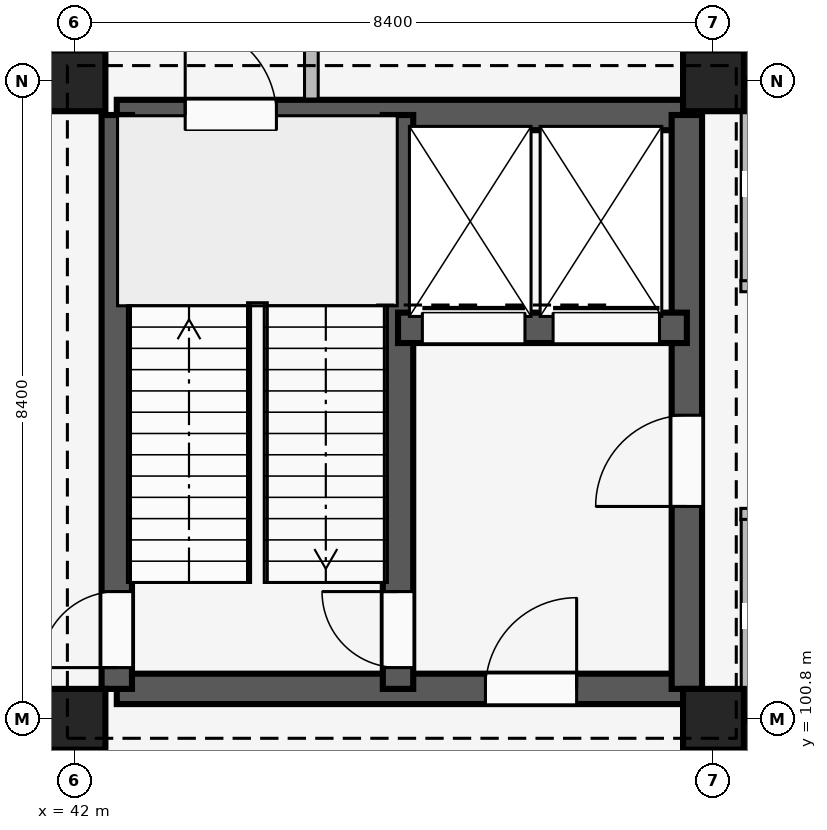
"""IFC4 building model, lengths in metres.
Left out: names, types, materials, properties, quantities, classifications, styles, units other than length and angle.
Written with IfcOpenShell. Run it as: python <this file> out.ifc"""

import sys

from ifc_helpers import new_model, si_unit, direction, frame, frame_2d, origin, origin_2d, place, context, subcontext, project, spatial, rectangle, extrude, element, fill, save


model = new_model("IFC4")
c1 = context("Model", 3, precision=1e-05, world=origin(), true_north=direction((0.0, 1.0)))
c2 = subcontext(c1, "Body", "Model", "MODEL_VIEW")
j1 = project(units=[si_unit("LENGTHUNIT", "METRE"), si_unit("PLANEANGLEUNIT", "RADIAN")], contexts=[c1])
p1 = place(None, origin())
s1 = spatial("IfcSite", under=j1, at=p1, CompositionType="ELEMENT")
p2 = place(p1, origin())
s2 = spatial("IfcBuilding", under=s1, at=p2, CompositionType="ELEMENT")
p3 = place(p2, origin())
s3 = spatial("IfcBuildingStorey", under=s2, at=p3, CompositionType="ELEMENT", Elevation=0.0)
for number, where, z_axis, x_axis in (
    (1, (42.0, 100.8, 0.0), (0.0, 0.0, 1.0), (1.0, 0.0, 0.0)),
    (2, (42.0, 109.2, 0.0), (0.0, 0.0, 1.0), (1.0, 0.0, 0.0)),
    (3, (50.4, 100.8, 0.0), (0.0, 0.0, 1.0), (1.0, 0.0, 0.0)),
    (4, (50.4, 109.2, 0.0), (0.0, 0.0, 1.0), (1.0, 0.0, 0.0)),
):
    element("IfcColumn", number, at=place(p3, frame(where, z_axis=z_axis, x_axis=x_axis)), inside=s3, PredefinedType="COLUMN", context=c2, shape_type="SweptSolid", body=[
        extrude(rectangle(XDim=0.8, YDim=0.8, at=origin_2d()), origin(), (0.0, 0.0, 1.0), 4.8),
    ])
p4 = place(p3, frame((42.55, 101.2, 0.0), z_axis=(0.0, 0.0, 1.0), x_axis=(1.0, 0.0, 0.0)))
e5 = element("IfcWall", 5, at=p4, inside=s3, PredefinedType="SHEAR", context=c2, shape_type="SweptSolid", body=[
    extrude(rectangle(XDim=7.5, YDim=0.4, at=frame_2d((3.75, 0.0))), origin(), (0.0, 0.0, 1.0), 4.52),
])
p5 = place(p4, frame((4.85, 0.0, 0.0)))
e6 = element("IfcOpeningElement", 6, at=p5, cuts=e5, PredefinedType="OPENING", context=c2, shape_type="SweptSolid", body=[
    extrude(rectangle(XDim=1.2, YDim=2.2, at=frame_2d((0.6, 1.1))), frame((0.0, 0.21, 0.0), z_axis=(0.0, -1.0, 0.0), x_axis=(1.0, 0.0, 0.0)), (0.0, 0.0, 1.0), 0.42),
])
p6 = place(p3, frame((42.55, 108.75, 0.0), z_axis=(0.0, 0.0, 1.0), x_axis=(1.0, 0.0, 0.0)))
e7 = element("IfcWall", 7, at=p6, inside=s3, PredefinedType="SHEAR", context=c2, shape_type="SweptSolid", body=[
    extrude(rectangle(XDim=7.5, YDim=0.4, at=frame_2d((3.75, 0.0))), origin(), (0.0, 0.0, 1.0), 4.52),
])
p7 = place(p6, frame((0.9, 0.0, 0.0)))
e8 = element("IfcOpeningElement", 8, at=p7, cuts=e7, PredefinedType="OPENING", context=c2, shape_type="SweptSolid", body=[
    extrude(rectangle(XDim=1.2, YDim=2.1, at=frame_2d((0.6, 1.05))), frame((0.0, 0.21, 0.0), z_axis=(0.0, -1.0, 0.0), x_axis=(1.0, 0.0, 0.0)), (0.0, 0.0, 1.0), 0.42),
])
p8 = place(p3, frame((42.55, 101.2, 0.0), z_axis=(0.0, 0.0, 1.0), x_axis=(0.0, 1.0, 0.0)))
e9 = element("IfcWall", 9, at=p8, inside=s3, PredefinedType="SHEAR", context=c2, shape_type="SweptSolid", body=[
    extrude(rectangle(XDim=7.55, YDim=0.4, at=frame_2d((3.775, 0.0))), origin(), (0.0, 0.0, 1.0), 4.52),
])
p9 = place(p8, frame((0.28, 0.0, 0.0)))
e10 = element("IfcOpeningElement", 10, at=p9, cuts=e9, PredefinedType="OPENING", context=c2, shape_type="SweptSolid", body=[
    extrude(rectangle(XDim=1.0, YDim=2.15, at=frame_2d((0.5, 1.075))), frame((0.0, 0.21, 0.0), z_axis=(0.0, -1.0, 0.0), x_axis=(1.0, 0.0, 0.0)), (0.0, 0.0, 1.0), 0.42),
])
p10 = place(p3, frame((50.05, 101.2, 0.0), z_axis=(0.0, 0.0, 1.0), x_axis=(0.0, 1.0, 0.0)))
e11 = element("IfcWall", 11, at=p10, inside=s3, PredefinedType="SHEAR", context=c2, shape_type="SweptSolid", body=[
    extrude(rectangle(XDim=7.55, YDim=0.4, at=frame_2d((3.775, 0.0))), origin(), (0.0, 0.0, 1.0), 4.52),
])
p11 = place(p10, frame((2.4, 0.0, 0.0)))
e12 = element("IfcOpeningElement", 12, at=p11, cuts=e11, PredefinedType="OPENING", context=c2, shape_type="SweptSolid", body=[
    extrude(rectangle(XDim=1.2, YDim=2.2, at=frame_2d((0.6, 1.1))), frame((0.0, 0.21, 0.0), z_axis=(0.0, -1.0, 0.0), x_axis=(1.0, 0.0, 0.0)), (0.0, 0.0, 1.0), 0.42),
])
p12 = place(p3, frame((46.25, 101.2, 0.0), z_axis=(0.0, 0.0, 1.0), x_axis=(0.0, 1.0, 0.0)))
e13 = element("IfcWall", 13, at=p12, inside=s3, PredefinedType="SHEAR", context=c2, shape_type="SweptSolid", body=[
    extrude(rectangle(XDim=7.55, YDim=0.4, at=frame_2d((3.775, 0.0))), origin(), (0.0, 0.0, 1.0), 4.52),
])
p13 = place(p12, frame((0.28, 0.0, 0.0)))
e14 = element("IfcOpeningElement", 14, at=p13, cuts=e13, PredefinedType="OPENING", context=c2, shape_type="SweptSolid", body=[
    extrude(rectangle(XDim=1.0, YDim=2.15, at=frame_2d((0.5, 1.075))), frame((0.0, 0.21, 0.0), z_axis=(0.0, -1.0, 0.0), x_axis=(1.0, 0.0, 0.0)), (0.0, 0.0, 1.0), 0.42),
])
p14 = place(p3, frame((46.25, 105.95, 0.0), z_axis=(0.0, 0.0, 1.0), x_axis=(1.0, 0.0, 0.0)))
e15 = element("IfcWall", 15, at=p14, inside=s3, PredefinedType="SHEAR", context=c2, shape_type="SweptSolid", body=[
    extrude(rectangle(XDim=3.8, YDim=0.4, at=frame_2d((1.9, 0.0))), origin(), (0.0, 0.0, 1.0), 4.52),
])
p15 = place(p14, frame((0.32, 0.0, 0.0)))
e16 = element("IfcOpeningElement", 16, at=p15, cuts=e15, PredefinedType="OPENING", context=c2, shape_type="SweptSolid", body=[
    extrude(rectangle(XDim=1.35, YDim=2.25, at=frame_2d((0.675, 1.125))), frame((0.0, 0.21, 0.0), z_axis=(0.0, -1.0, 0.0), x_axis=(1.0, 0.0, 0.0)), (0.0, 0.0, 1.0), 0.42),
])
p16 = place(p14, frame((2.04, 0.0, 0.0)))
e17 = element("IfcOpeningElement", 17, at=p16, cuts=e15, PredefinedType="OPENING", context=c2, shape_type="SweptSolid", body=[
    extrude(rectangle(XDim=1.4, YDim=2.25, at=frame_2d((0.7, 1.125))), frame((0.0, 0.21, 0.0), z_axis=(0.0, -1.0, 0.0), x_axis=(1.0, 0.0, 0.0)), (0.0, 0.0, 1.0), 0.42),
])
p17 = place(p3, frame((42.0, 92.54, 0.0), z_axis=(0.0, 0.0, 1.0), x_axis=(0.0, 1.0, 0.0)))
e18 = element("IfcWall", 18, at=p17, inside=s3, PredefinedType="PARTITIONING", context=c2, shape_type="SweptSolid", body=[
    extrude(rectangle(XDim=8.21, YDim=0.13, at=frame_2d((4.105, 0.0))), origin(), (0.0, 0.0, 1.0), 3.8),
])
p18 = place(p17, frame((3.64, 0.0, 0.0)))
e19 = element("IfcOpeningElement", 19, at=p18, cuts=e18, PredefinedType="OPENING", context=c2, shape_type="SweptSolid", body=[
    extrude(rectangle(XDim=1.08, YDim=2.15, at=frame_2d((0.54, 1.075))), frame((0.0, 0.075, 0.0), z_axis=(0.0, -1.0, 0.0), x_axis=(1.0, 0.0, 0.0)), (0.0, 0.0, 1.0), 0.15),
])
p19 = place(p3, frame((42.0, 109.55, 0.0), z_axis=(0.0, 0.0, 1.0), x_axis=(0.0, 1.0, 0.0)))
e20 = element("IfcWall", 20, at=p19, inside=s3, PredefinedType="PARTITIONING", context=c2, shape_type="SweptSolid", body=[
    extrude(rectangle(XDim=7.91, YDim=0.13, at=frame_2d((3.955, 0.0))), origin(), (0.0, 0.0, 1.0), 3.8),
])
p20 = place(p19, frame((3.4, 0.0, 0.0)))
e21 = element("IfcOpeningElement", 21, at=p20, cuts=e20, PredefinedType="OPENING", context=c2, shape_type="SweptSolid", body=[
    extrude(rectangle(XDim=1.05, YDim=2.2, at=frame_2d((0.525, 1.1))), frame((0.0, 0.075, 0.0), z_axis=(0.0, -1.0, 0.0), x_axis=(1.0, 0.0, 0.0)), (0.0, 0.0, 1.0), 0.15),
])
p21 = place(p3, frame((45.11, 108.96, 0.0), z_axis=(0.0, 0.0, 1.0), x_axis=(0.0, 1.0, 0.0)))
e22 = element("IfcWall", 22, at=p21, inside=s3, PredefinedType="PARTITIONING", context=c2, shape_type="SweptSolid", body=[
    extrude(rectangle(XDim=8.5, YDim=0.18, at=frame_2d((4.25, 0.0))), origin(), (0.0, 0.0, 1.0), 3.8),
])
p22 = place(p3, frame((50.4, 92.54, 0.0), z_axis=(0.0, 0.0, 1.0), x_axis=(0.0, 1.0, 0.0)))
e23 = element("IfcWall", 23, at=p22, inside=s3, PredefinedType="PARTITIONING", context=c2, shape_type="SweptSolid", body=[
    extrude(rectangle(XDim=8.21, YDim=0.13, at=frame_2d((4.105, 0.0))), origin(), (0.0, 0.0, 1.0), 3.8),
])
p23 = place(p22, frame((3.64, 0.0, 0.0)))
e24 = element("IfcOpeningElement", 24, at=p23, cuts=e23, PredefinedType="OPENING", context=c2, shape_type="SweptSolid", body=[
    extrude(rectangle(XDim=1.08, YDim=2.15, at=frame_2d((0.54, 1.075))), frame((0.0, 0.075, 0.0), z_axis=(0.0, -1.0, 0.0), x_axis=(1.0, 0.0, 0.0)), (0.0, 0.0, 1.0), 0.15),
])
p24 = place(p3, frame((50.4, 109.55, 0.0), z_axis=(0.0, 0.0, 1.0), x_axis=(0.0, 1.0, 0.0)))
e25 = element("IfcWall", 25, at=p24, inside=s3, PredefinedType="PARTITIONING", context=c2, shape_type="SweptSolid", body=[
    extrude(rectangle(XDim=7.91, YDim=0.13, at=frame_2d((3.955, 0.0))), origin(), (0.0, 0.0, 1.0), 3.8),
])
p25 = place(p24, frame((3.4, 0.0, 0.0)))
e26 = element("IfcOpeningElement", 26, at=p25, cuts=e25, PredefinedType="OPENING", context=c2, shape_type="SweptSolid", body=[
    extrude(rectangle(XDim=1.05, YDim=2.2, at=frame_2d((0.525, 1.1))), frame((0.0, 0.075, 0.0), z_axis=(0.0, -1.0, 0.0), x_axis=(1.0, 0.0, 0.0)), (0.0, 0.0, 1.0), 0.15),
])
p26 = place(p3, frame((50.76, 103.5, 0.0), z_axis=(0.0, 0.0, 1.0), x_axis=(1.0, 0.0, 0.0)))
e27 = element("IfcWall", 27, at=p26, inside=s3, PredefinedType="PARTITIONING", context=c2, shape_type="SweptSolid", body=[
    extrude(rectangle(XDim=7.96, YDim=0.15, at=frame_2d((3.98, 0.0))), origin(), (0.0, 0.0, 1.0), 3.8),
])
p27 = place(p26, frame((2.25, 0.0, 0.0)))
e28 = element("IfcOpeningElement", 28, at=p27, cuts=e27, PredefinedType="OPENING", context=c2, shape_type="SweptSolid", body=[
    extrude(rectangle(XDim=1.05, YDim=2.2, at=frame_2d((0.525, 1.1))), frame((0.0, 0.085, 0.0), z_axis=(0.0, -1.0, 0.0), x_axis=(1.0, 0.0, 0.0)), (0.0, 0.0, 1.0), 0.17),
])
p28 = place(p26, frame((5.95, 0.0, 0.0)))
e29 = element("IfcOpeningElement", 29, at=p28, cuts=e27, PredefinedType="OPENING", context=c2, shape_type="SweptSolid", body=[
    extrude(rectangle(XDim=1.05, YDim=2.2, at=frame_2d((0.525, 1.1))), frame((0.0, 0.085, 0.0), z_axis=(0.0, -1.0, 0.0), x_axis=(1.0, 0.0, 0.0)), (0.0, 0.0, 1.0), 0.17),
])
p29 = place(p3, frame((50.82, 100.82, 0.0), z_axis=(0.0, 0.0, 1.0), x_axis=(0.0, 1.0, 0.0)))
e30 = element("IfcWall", 30, at=p29, inside=s3, PredefinedType="PARTITIONING", context=c2, shape_type="SweptSolid", body=[
    extrude(rectangle(XDim=2.61, YDim=0.11, at=frame_2d((1.305, 0.0))), origin(), (0.0, 0.0, 1.0), 3.8),
])
p30 = place(p3, frame((50.82, 100.82, 0.0), z_axis=(0.0, 0.0, 1.0), x_axis=(1.0, 0.0, 0.0)))
e31 = element("IfcWall", 31, at=p30, inside=s3, PredefinedType="PARTITIONING", context=c2, shape_type="SweptSolid", body=[
    extrude(rectangle(XDim=1.98, YDim=0.11, at=frame_2d((0.99, 0.0))), origin(), (0.0, 0.0, 1.0), 3.8),
])
p31 = place(p30, frame((0.54, 0.0, 0.0)))
e32 = element("IfcOpeningElement", 32, at=p31, cuts=e31, PredefinedType="OPENING", context=c2, shape_type="SweptSolid", body=[
    extrude(rectangle(XDim=0.9, YDim=2.1, at=frame_2d((0.45, 1.05))), frame((0.0, 0.065, 0.0), z_axis=(0.0, -1.0, 0.0), x_axis=(1.0, 0.0, 0.0)), (0.0, 0.0, 1.0), 0.13),
])
p32 = place(p3, frame((58.72, 106.5, 0.0), z_axis=(0.0, 0.0, 1.0), x_axis=(-1.0, 0.0, 0.0)))
e33 = element("IfcWall", 33, at=p32, inside=s3, PredefinedType="PARTITIONING", context=c2, shape_type="SweptSolid", body=[
    extrude(rectangle(XDim=7.96, YDim=0.15, at=frame_2d((3.98, 0.0))), origin(), (0.0, 0.0, 1.0), 3.8),
])
p33 = place(p32, frame((0.73, 0.0, 0.0)))
e34 = element("IfcOpeningElement", 34, at=p33, cuts=e33, PredefinedType="OPENING", context=c2, shape_type="SweptSolid", body=[
    extrude(rectangle(XDim=1.05, YDim=2.2, at=frame_2d((0.525, 1.1))), frame((0.0, 0.085, 0.0), z_axis=(0.0, -1.0, 0.0), x_axis=(1.0, 0.0, 0.0)), (0.0, 0.0, 1.0), 0.17),
])
p34 = place(p32, frame((4.43, 0.0, 0.0)))
e35 = element("IfcOpeningElement", 35, at=p34, cuts=e33, PredefinedType="OPENING", context=c2, shape_type="SweptSolid", body=[
    extrude(rectangle(XDim=1.05, YDim=2.2, at=frame_2d((0.525, 1.1))), frame((0.0, 0.085, 0.0), z_axis=(0.0, -1.0, 0.0), x_axis=(1.0, 0.0, 0.0)), (0.0, 0.0, 1.0), 0.17),
])
p35 = place(p3, frame((50.82, 106.57, 0.0), z_axis=(0.0, 0.0, 1.0), x_axis=(0.0, 1.0, 0.0)))
e36 = element("IfcWall", 36, at=p35, inside=s3, PredefinedType="PARTITIONING", context=c2, shape_type="SweptSolid", body=[
    extrude(rectangle(XDim=2.61, YDim=0.11, at=frame_2d((1.305, 0.0))), origin(), (0.0, 0.0, 1.0), 3.8),
])
p36 = place(p3, frame((50.82, 109.18, 0.0), z_axis=(0.0, 0.0, 1.0), x_axis=(1.0, 0.0, 0.0)))
e37 = element("IfcWall", 37, at=p36, inside=s3, PredefinedType="PARTITIONING", context=c2, shape_type="SweptSolid", body=[
    extrude(rectangle(XDim=1.98, YDim=0.11, at=frame_2d((0.99, 0.0))), origin(), (0.0, 0.0, 1.0), 3.8),
])
p37 = place(p36, frame((0.54, 0.0, 0.0)))
e38 = element("IfcOpeningElement", 38, at=p37, cuts=e37, PredefinedType="OPENING", context=c2, shape_type="SweptSolid", body=[
    extrude(rectangle(XDim=0.9, YDim=2.1, at=frame_2d((0.45, 1.05))), frame((0.0, 0.065, 0.0), z_axis=(0.0, -1.0, 0.0), x_axis=(1.0, 0.0, 0.0)), (0.0, 0.0, 1.0), 0.13),
])
p38 = place(p11, origin())
e39 = element("IfcDoor", 39, at=p38, inside=s3, OperationType="SINGLE_SWING_LEFT", PredefinedType="DOOR", context=c2, shape_type="SweptSolid", body=[
    extrude(rectangle(XDim=1.2, YDim=2.2, at=frame_2d((0.6, 1.1))), frame((0.0, 0.025, 0.0), z_axis=(0.0, -1.0, 0.0), x_axis=(1.0, 0.0, 0.0)), (0.0, 0.0, 1.0), 0.05),
])
fill(e12, e39)
p39 = place(p5, origin())
e40 = element("IfcDoor", 40, at=p39, inside=s3, OperationType="SINGLE_SWING_RIGHT", PredefinedType="DOOR", context=c2, shape_type="SweptSolid", body=[
    extrude(rectangle(XDim=1.2, YDim=2.2, at=frame_2d((0.6, 1.1))), frame((0.0, 0.025, 0.0), z_axis=(0.0, -1.0, 0.0), x_axis=(1.0, 0.0, 0.0)), (0.0, 0.0, 1.0), 0.05),
])
fill(e6, e40)
p40 = place(p9, origin())
e41 = element("IfcDoor", 41, at=p40, inside=s3, OperationType="SINGLE_SWING_LEFT", PredefinedType="DOOR", context=c2, shape_type="SweptSolid", body=[
    extrude(rectangle(XDim=1.0, YDim=2.15, at=frame_2d((0.5, 1.075))), frame((0.0, 0.025, 0.0), z_axis=(0.0, -1.0, 0.0), x_axis=(1.0, 0.0, 0.0)), (0.0, 0.0, 1.0), 0.05),
])
fill(e10, e41)
p41 = place(p13, origin())
e42 = element("IfcDoor", 42, at=p41, inside=s3, OperationType="SINGLE_SWING_RIGHT", PredefinedType="DOOR", context=c2, shape_type="SweptSolid", body=[
    extrude(rectangle(XDim=1.0, YDim=2.15, at=frame_2d((0.5, 1.075))), frame((0.0, 0.025, 0.0), z_axis=(0.0, -1.0, 0.0), x_axis=(1.0, 0.0, 0.0)), (0.0, 0.0, 1.0), 0.05),
])
fill(e14, e42)
p42 = place(p7, origin())
e43 = element("IfcDoor", 43, at=p42, inside=s3, OperationType="SINGLE_SWING_LEFT", PredefinedType="DOOR", context=c2, shape_type="SweptSolid", body=[
    extrude(rectangle(XDim=1.2, YDim=2.1, at=frame_2d((0.6, 1.05))), frame((0.0, 0.025, 0.0), z_axis=(0.0, -1.0, 0.0), x_axis=(1.0, 0.0, 0.0)), (0.0, 0.0, 1.0), 0.05),
])
fill(e8, e43)
p43 = place(p15, origin())
e44 = element("IfcDoor", 44, at=p43, inside=s3, OperationType="SLIDING_TO_LEFT", PredefinedType="DOOR", context=c2, shape_type="SweptSolid", body=[
    extrude(rectangle(XDim=1.35, YDim=2.25, at=frame_2d((0.675, 1.125))), frame((0.0, 0.025, 0.0), z_axis=(0.0, -1.0, 0.0), x_axis=(1.0, 0.0, 0.0)), (0.0, 0.0, 1.0), 0.05),
])
fill(e16, e44)
p44 = place(p16, origin())
e45 = element("IfcDoor", 45, at=p44, inside=s3, OperationType="SLIDING_TO_LEFT", PredefinedType="DOOR", context=c2, shape_type="SweptSolid", body=[
    extrude(rectangle(XDim=1.4, YDim=2.25, at=frame_2d((0.7, 1.125))), frame((0.0, 0.025, 0.0), z_axis=(0.0, -1.0, 0.0), x_axis=(1.0, 0.0, 0.0)), (0.0, 0.0, 1.0), 0.05),
])
fill(e17, e45)
save(model, sys.argv[1])
